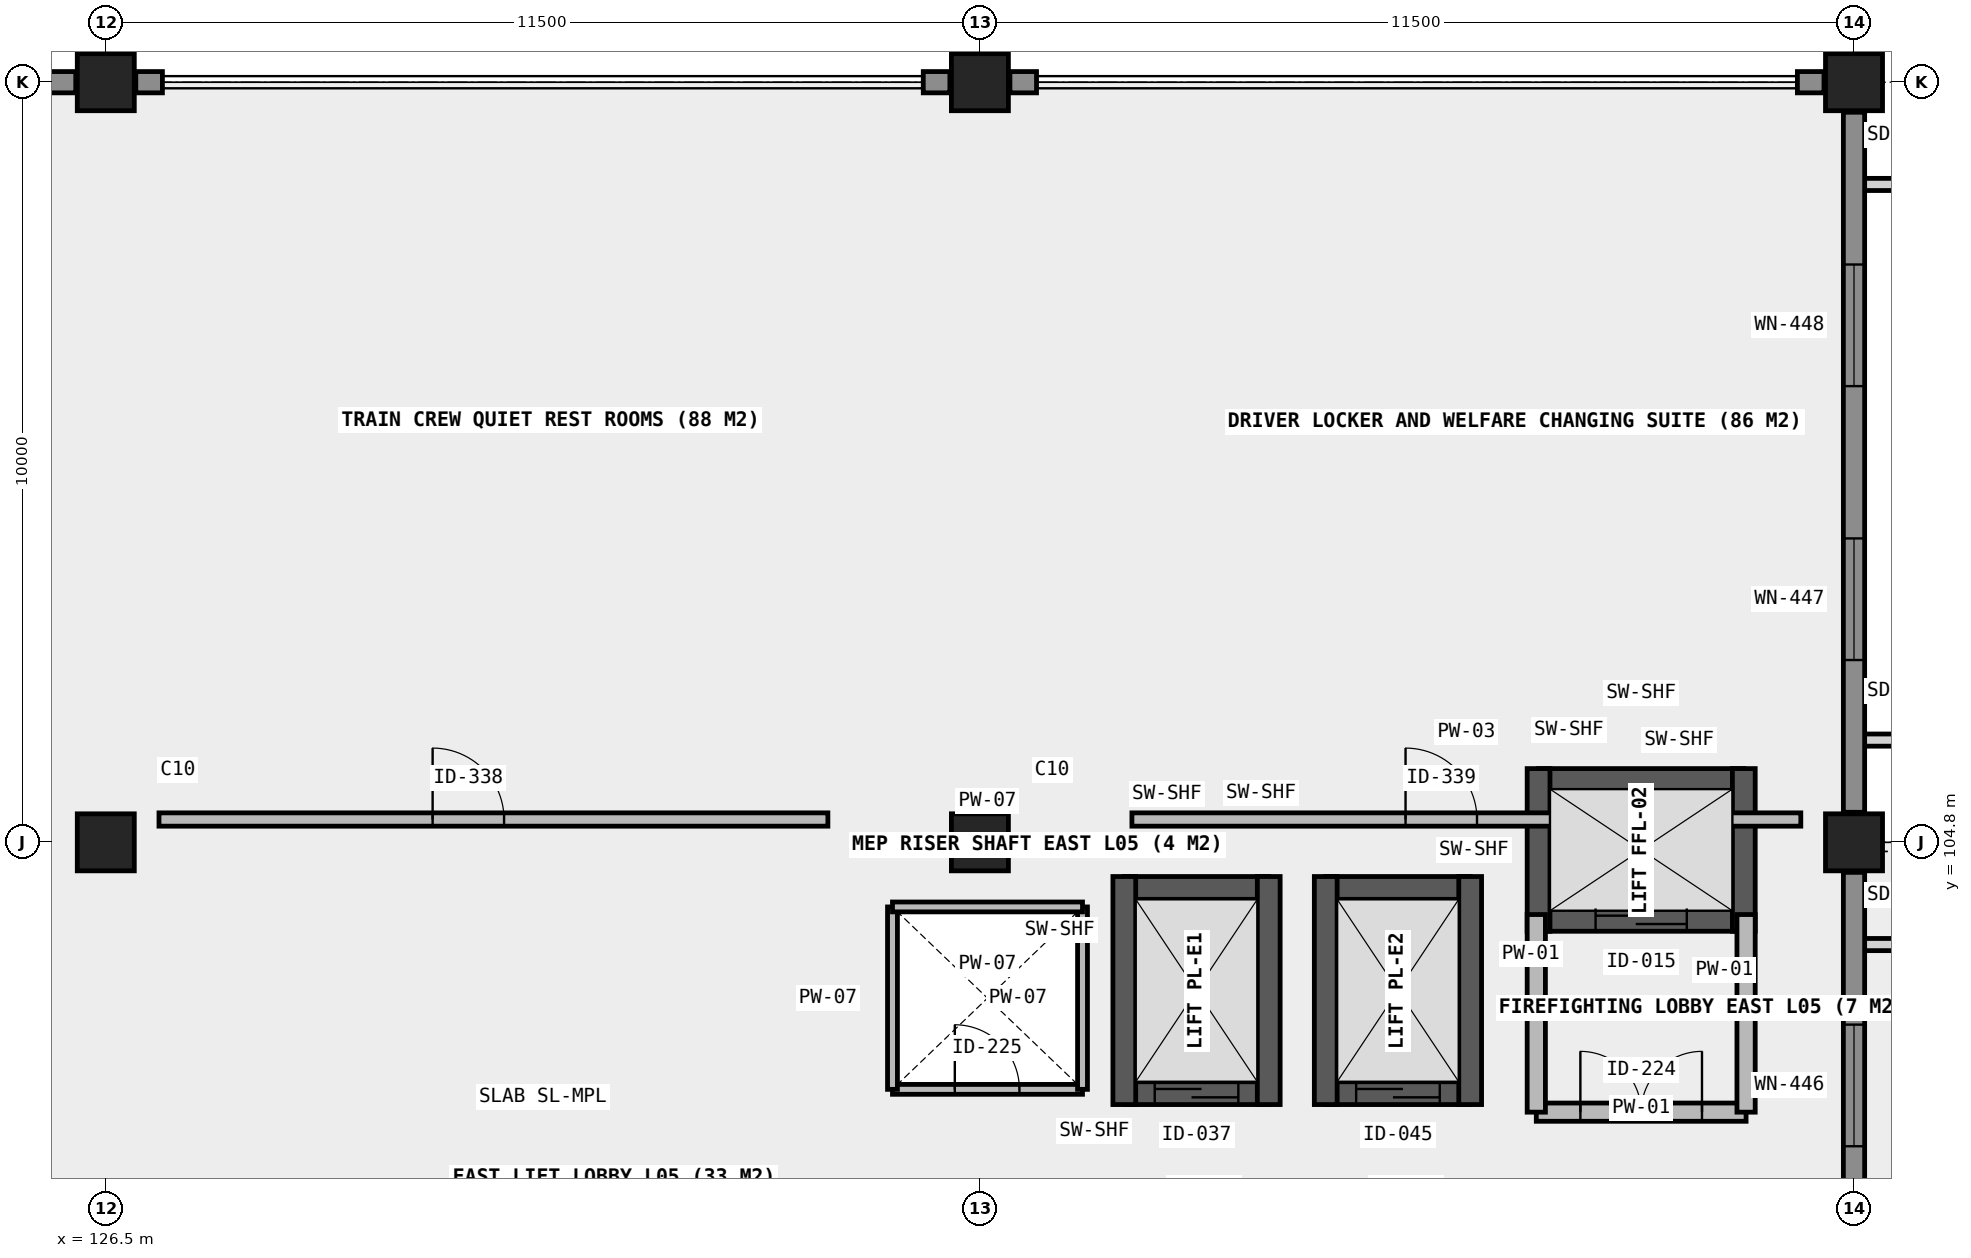
"""IFC4 building model, lengths in metres.
Left out: names, types, materials, properties, quantities, classifications, styles, units other than length and angle.
Written with IfcOpenShell. Run it as: python <this file> out.ifc"""

import sys

from ifc_helpers import new_model, si_unit, direction, frame, frame_2d, origin, origin_2d, place, context, subcontext, project, spatial, rectangle, circle, extrude, element, fill, save


model = new_model("IFC4")
c1 = context("Model", 3, precision=1e-05, world=origin(), true_north=direction((0.0, 1.0)))
c2 = subcontext(c1, "Body", "Model", "MODEL_VIEW")
j1 = project(units=[si_unit("LENGTHUNIT", "METRE"), si_unit("PLANEANGLEUNIT", "RADIAN")], contexts=[c1])
p1 = place(None, origin())
s1 = spatial("IfcSite", under=j1, at=p1, CompositionType="ELEMENT")
p2 = place(p1, origin())
s2 = spatial("IfcBuilding", under=s1, at=p2, CompositionType="ELEMENT")
p3 = place(p2, frame((0.0, 0.0, 22.46)))
s3 = spatial("IfcBuildingStorey", under=s2, at=p3, CompositionType="ELEMENT", Elevation=22.46)
for number, where, z_axis, x_axis in (
    (1, (126.5, 104.8, 0.0), (0.0, 0.0, 1.0), (1.0, 0.0, 0.0)),
    (2, (126.5, 114.8, 0.0), (0.0, 0.0, 1.0), (1.0, 0.0, 0.0)),
    (3, (138.0, 104.8, 0.0), (0.0, 0.0, 1.0), (1.0, 0.0, 0.0)),
    (4, (138.0, 114.8, 0.0), (0.0, 0.0, 1.0), (1.0, 0.0, 0.0)),
    (5, (149.5, 104.8, 0.0), (0.0, 0.0, 1.0), (1.0, 0.0, 0.0)),
    (6, (149.5, 114.8, 0.0), (0.0, 0.0, 1.0), (1.0, 0.0, 0.0)),
):
    element("IfcColumn", number, at=place(p3, frame(where, z_axis=z_axis, x_axis=x_axis)), inside=s3, PredefinedType="COLUMN", context=c2, shape_type="SweptSolid", body=[
        extrude(circle(Radius=0.375, at=origin_2d()), origin(), (0.0, 0.0, 1.0), 4.44),
    ])
p4 = place(p3, frame((145.35, 103.78, 0.0), z_axis=(0.0, 0.0, 1.0), x_axis=(1.0, 0.0, 0.0)))
e7 = element("IfcWall", 7, at=p4, inside=s3, PredefinedType="SHEAR", context=c2, shape_type="SweptSolid", body=[
    extrude(rectangle(XDim=2.7, YDim=0.3, at=frame_2d((1.35, 0.0))), origin(), (0.0, 0.0, 1.0), 4.16),
])
p5 = place(p4, frame((0.75, 0.0, 0.0)))
e8 = element("IfcOpeningElement", 8, at=p5, cuts=e7, PredefinedType="OPENING", context=c2, shape_type="SweptSolid", body=[
    extrude(rectangle(XDim=1.2, YDim=2.15, at=frame_2d((0.6, 1.075))), frame((0.0, 0.16, 0.0), z_axis=(0.0, -1.0, 0.0), x_axis=(1.0, 0.0, 0.0)), (0.0, 0.0, 1.0), 0.32),
])
p6 = place(p3, frame((145.35, 105.62, 0.0), z_axis=(0.0, 0.0, 1.0), x_axis=(1.0, 0.0, 0.0)))
e9 = element("IfcWall", 9, at=p6, inside=s3, PredefinedType="SHEAR", context=c2, shape_type="SweptSolid", body=[
    extrude(rectangle(XDim=2.7, YDim=0.3, at=frame_2d((1.35, 0.0))), origin(), (0.0, 0.0, 1.0), 4.16),
])
for number, where, z_axis, x_axis in (
    (10, (145.35, 103.63, 0.0), (0.0, 0.0, 1.0), (0.0, 1.0, 0.0)),
    (11, (148.05, 103.63, 0.0), (0.0, 0.0, 1.0), (0.0, 1.0, 0.0)),
):
    element("IfcWall", number, at=place(p3, frame(where, z_axis=z_axis, x_axis=x_axis)), inside=s3, PredefinedType="SHEAR", context=c2, shape_type="SweptSolid", body=[
        extrude(rectangle(XDim=2.14, YDim=0.3, at=frame_2d((1.07, 0.0))), origin(), (0.0, 0.0, 1.0), 4.16),
    ])
p7 = place(p3, frame((139.9, 101.5, 0.0), z_axis=(0.0, 0.0, 1.0), x_axis=(1.0, 0.0, 0.0)))
e12 = element("IfcWall", 12, at=p7, inside=s3, PredefinedType="SHEAR", context=c2, shape_type="SweptSolid", body=[
    extrude(rectangle(XDim=1.9, YDim=0.3, at=frame_2d((0.95, 0.0))), origin(), (0.0, 0.0, 1.0), 4.16),
])
p8 = place(p7, frame((0.4, 0.0, 0.0)))
e13 = element("IfcOpeningElement", 13, at=p8, cuts=e12, PredefinedType="OPENING", context=c2, shape_type="SweptSolid", body=[
    extrude(rectangle(XDim=1.1, YDim=2.15, at=frame_2d((0.55, 1.075))), frame((0.0, 0.16, 0.0), z_axis=(0.0, -1.0, 0.0), x_axis=(1.0, 0.0, 0.0)), (0.0, 0.0, 1.0), 0.32),
])
p9 = place(p3, frame((139.9, 104.2, 0.0), z_axis=(0.0, 0.0, 1.0), x_axis=(1.0, 0.0, 0.0)))
e14 = element("IfcWall", 14, at=p9, inside=s3, PredefinedType="SHEAR", context=c2, shape_type="SweptSolid", body=[
    extrude(rectangle(XDim=1.9, YDim=0.3, at=frame_2d((0.95, 0.0))), origin(), (0.0, 0.0, 1.0), 4.16),
])
for number, where, z_axis, x_axis in (
    (15, (139.9, 101.35, 0.0), (0.0, 0.0, 1.0), (0.0, 1.0, 0.0)),
    (16, (141.8, 101.35, 0.0), (0.0, 0.0, 1.0), (0.0, 1.0, 0.0)),
):
    element("IfcWall", number, at=place(p3, frame(where, z_axis=z_axis, x_axis=x_axis)), inside=s3, PredefinedType="SHEAR", context=c2, shape_type="SweptSolid", body=[
        extrude(rectangle(XDim=3.0, YDim=0.3, at=frame_2d((1.5, 0.0))), origin(), (0.0, 0.0, 1.0), 4.16),
    ])
p10 = place(p3, frame((142.55, 101.5, 0.0), z_axis=(0.0, 0.0, 1.0), x_axis=(1.0, 0.0, 0.0)))
e17 = element("IfcWall", 17, at=p10, inside=s3, PredefinedType="SHEAR", context=c2, shape_type="SweptSolid", body=[
    extrude(rectangle(XDim=1.9, YDim=0.3, at=frame_2d((0.95, 0.0))), origin(), (0.0, 0.0, 1.0), 4.16),
])
p11 = place(p10, frame((0.4, 0.0, 0.0)))
e18 = element("IfcOpeningElement", 18, at=p11, cuts=e17, PredefinedType="OPENING", context=c2, shape_type="SweptSolid", body=[
    extrude(rectangle(XDim=1.1, YDim=2.15, at=frame_2d((0.55, 1.075))), frame((0.0, 0.16, 0.0), z_axis=(0.0, -1.0, 0.0), x_axis=(1.0, 0.0, 0.0)), (0.0, 0.0, 1.0), 0.32),
])
p12 = place(p3, frame((142.55, 104.2, 0.0), z_axis=(0.0, 0.0, 1.0), x_axis=(1.0, 0.0, 0.0)))
e19 = element("IfcWall", 19, at=p12, inside=s3, PredefinedType="SHEAR", context=c2, shape_type="SweptSolid", body=[
    extrude(rectangle(XDim=1.9, YDim=0.3, at=frame_2d((0.95, 0.0))), origin(), (0.0, 0.0, 1.0), 4.16),
])
for number, where, z_axis, x_axis in (
    (20, (142.55, 101.35, 0.0), (0.0, 0.0, 1.0), (0.0, 1.0, 0.0)),
    (21, (144.45, 101.35, 0.0), (0.0, 0.0, 1.0), (0.0, 1.0, 0.0)),
):
    element("IfcWall", number, at=place(p3, frame(where, z_axis=z_axis, x_axis=x_axis)), inside=s3, PredefinedType="SHEAR", context=c2, shape_type="SweptSolid", body=[
        extrude(rectangle(XDim=3.0, YDim=0.3, at=frame_2d((1.5, 0.0))), origin(), (0.0, 0.0, 1.0), 4.16),
    ])
p13 = place(p3, frame((149.5, 95.195, 0.0), z_axis=(0.0, 0.0, 1.0), x_axis=(0.0, 1.0, 0.0)))
e22 = element("IfcWall", 22, at=p13, inside=s3, PredefinedType="SOLIDWALL", context=c2, shape_type="SweptSolid", body=[
    extrude(rectangle(XDim=9.21, YDim=0.28, at=frame_2d((4.605, 0.0))), origin(), (0.0, 0.0, 1.0), 3.36),
])
p14 = place(p13, frame((2.003, 0.0, 0.85)))
e23 = element("IfcOpeningElement", 23, at=p14, cuts=e22, PredefinedType="OPENING", context=c2, shape_type="SweptSolid", body=[
    extrude(rectangle(XDim=1.6, YDim=1.6, at=frame_2d((0.8, 0.8))), frame((0.0, 0.15, 0.0), z_axis=(0.0, -1.0, 0.0), x_axis=(1.0, 0.0, 0.0)), (0.0, 0.0, 1.0), 0.3),
])
p15 = place(p13, frame((5.607, 0.0, 0.85)))
e24 = element("IfcOpeningElement", 24, at=p15, cuts=e22, PredefinedType="OPENING", context=c2, shape_type="SweptSolid", body=[
    extrude(rectangle(XDim=1.6, YDim=1.6, at=frame_2d((0.8, 0.8))), frame((0.0, 0.15, 0.0), z_axis=(0.0, -1.0, 0.0), x_axis=(1.0, 0.0, 0.0)), (0.0, 0.0, 1.0), 0.3),
])
p16 = place(p3, frame((149.5, 105.195, 0.0), z_axis=(0.0, 0.0, 1.0), x_axis=(0.0, 1.0, 0.0)))
e25 = element("IfcWall", 25, at=p16, inside=s3, PredefinedType="SOLIDWALL", context=c2, shape_type="SweptSolid", body=[
    extrude(rectangle(XDim=9.21, YDim=0.28, at=frame_2d((4.605, 0.0))), origin(), (0.0, 0.0, 1.0), 3.36),
])
p17 = place(p16, frame((2.003, 0.0, 0.85)))
e26 = element("IfcOpeningElement", 26, at=p17, cuts=e25, PredefinedType="OPENING", context=c2, shape_type="SweptSolid", body=[
    extrude(rectangle(XDim=1.6, YDim=1.6, at=frame_2d((0.8, 0.8))), frame((0.0, 0.15, 0.0), z_axis=(0.0, -1.0, 0.0), x_axis=(1.0, 0.0, 0.0)), (0.0, 0.0, 1.0), 0.3),
])
p18 = place(p16, frame((5.607, 0.0, 0.85)))
e27 = element("IfcOpeningElement", 27, at=p18, cuts=e25, PredefinedType="OPENING", context=c2, shape_type="SweptSolid", body=[
    extrude(rectangle(XDim=1.6, YDim=1.6, at=frame_2d((0.8, 0.8))), frame((0.0, 0.15, 0.0), z_axis=(0.0, -1.0, 0.0), x_axis=(1.0, 0.0, 0.0)), (0.0, 0.0, 1.0), 0.3),
])
p19 = place(p3, frame((115.395, 114.8, 0.0), z_axis=(0.0, 0.0, 1.0), x_axis=(1.0, 0.0, 0.0)))
e28 = element("IfcWall", 28, at=p19, inside=s3, PredefinedType="SOLIDWALL", context=c2, shape_type="SweptSolid", body=[
    extrude(rectangle(XDim=10.71, YDim=0.28, at=frame_2d((5.355, 0.0))), origin(), (0.0, 0.0, 1.0), 3.36),
])
p20 = place(p19, frame((2.737, 0.0, 0.85)))
e29 = element("IfcOpeningElement", 29, at=p20, cuts=e28, PredefinedType="OPENING", context=c2, shape_type="SweptSolid", body=[
    extrude(rectangle(XDim=1.25, YDim=1.65, at=frame_2d((0.625, 0.825))), frame((0.0, 0.15, 0.0), z_axis=(0.0, -1.0, 0.0), x_axis=(1.0, 0.0, 0.0)), (0.0, 0.0, 1.0), 0.3),
])
p21 = place(p19, frame((6.723, 0.0, 0.85)))
e30 = element("IfcOpeningElement", 30, at=p21, cuts=e28, PredefinedType="OPENING", context=c2, shape_type="SweptSolid", body=[
    extrude(rectangle(XDim=1.25, YDim=1.65, at=frame_2d((0.625, 0.825))), frame((0.0, 0.15, 0.0), z_axis=(0.0, -1.0, 0.0), x_axis=(1.0, 0.0, 0.0)), (0.0, 0.0, 1.0), 0.3),
])
for number, where, z_axis, x_axis in (
    (31, (126.895, 114.8, 0.0), (0.0, 0.0, 1.0), (1.0, 0.0, 0.0)),
    (32, (137.255, 114.8, 0.0), (0.0, 0.0, 1.0), (1.0, 0.0, 0.0)),
    (33, (138.395, 114.8, 0.0), (0.0, 0.0, 1.0), (1.0, 0.0, 0.0)),
    (34, (148.755, 114.8, 0.0), (0.0, 0.0, 1.0), (1.0, 0.0, 0.0)),
):
    element("IfcWall", number, at=place(p3, frame(where, z_axis=z_axis, x_axis=x_axis)), inside=s3, PredefinedType="SOLIDWALL", context=c2, shape_type="SweptSolid", body=[
        extrude(rectangle(XDim=0.35, YDim=0.28, at=frame_2d((0.175, 0.0))), origin(), (0.0, 0.0, 1.0), 4.15),
    ])
p22 = place(p3, frame((145.32, 101.25, 0.0), z_axis=(0.0, 0.0, 1.0), x_axis=(1.0, 0.0, 0.0)))
e35 = element("IfcWall", 35, at=p22, inside=s3, PredefinedType="SOLIDWALL", context=c2, shape_type="SweptSolid", body=[
    extrude(rectangle(XDim=2.76, YDim=0.24, at=frame_2d((1.38, 0.0))), origin(), (0.0, 0.0, 1.0), 4.14),
])
p23 = place(p22, frame((0.58, 0.0, 0.0)))
e36 = element("IfcOpeningElement", 36, at=p23, cuts=e35, PredefinedType="OPENING", context=c2, shape_type="SweptSolid", body=[
    extrude(rectangle(XDim=1.6, YDim=2.15, at=frame_2d((0.8, 1.075))), frame((0.0, 0.13, 0.0), z_axis=(0.0, -1.0, 0.0), x_axis=(1.0, 0.0, 0.0)), (0.0, 0.0, 1.0), 0.26),
])
for number, where, z_axis, x_axis in (
    (37, (145.32, 101.25, 0.0), (0.0, 0.0, 1.0), (0.0, 1.0, 0.0)),
    (38, (148.08, 101.25, 0.0), (0.0, 0.0, 1.0), (0.0, 1.0, 0.0)),
):
    element("IfcWall", number, at=place(p3, frame(where, z_axis=z_axis, x_axis=x_axis)), inside=s3, PredefinedType="SOLIDWALL", context=c2, shape_type="SweptSolid", body=[
        extrude(rectangle(XDim=2.6, YDim=0.24, at=frame_2d((1.3, 0.0))), origin(), (0.0, 0.0, 1.0), 4.14),
    ])
p24 = place(p3, frame((136.85, 101.55, 0.0), z_axis=(0.0, 0.0, 1.0), x_axis=(1.0, 0.0, 0.0)))
e39 = element("IfcWall", 39, at=p24, inside=s3, PredefinedType="PLUMBINGWALL", context=c2, shape_type="SweptSolid", body=[
    extrude(rectangle(XDim=2.5, YDim=0.13, at=frame_2d((1.25, 0.0))), origin(), (0.0, 0.0, 1.0), 4.14),
])
p25 = place(p24, frame((0.82, 0.0, 0.0)))
e40 = element("IfcOpeningElement", 40, at=p25, cuts=e39, PredefinedType="OPENING", context=c2, shape_type="SweptSolid", body=[
    extrude(rectangle(XDim=0.85, YDim=2.0, at=frame_2d((0.425, 1.0))), frame((0.0, 0.075, 0.0), z_axis=(0.0, -1.0, 0.0), x_axis=(1.0, 0.0, 0.0)), (0.0, 0.0, 1.0), 0.15),
])
for number, where, z_axis, x_axis in (
    (41, (136.85, 101.55, 0.0), (0.0, 0.0, 1.0), (0.0, 1.0, 0.0)),
    (42, (139.35, 101.55, 0.0), (0.0, 0.0, 1.0), (0.0, 1.0, 0.0)),
):
    element("IfcWall", number, at=place(p3, frame(where, z_axis=z_axis, x_axis=x_axis)), inside=s3, PredefinedType="PLUMBINGWALL", context=c2, shape_type="SweptSolid", body=[
        extrude(rectangle(XDim=2.4, YDim=0.13, at=frame_2d((1.2, 0.0))), origin(), (0.0, 0.0, 1.0), 4.14),
    ])
p26 = place(p3, frame((136.85, 103.95, 0.0), z_axis=(0.0, 0.0, 1.0), x_axis=(1.0, 0.0, 0.0)))
e43 = element("IfcWall", 43, at=p26, inside=s3, PredefinedType="PLUMBINGWALL", context=c2, shape_type="SweptSolid", body=[
    extrude(rectangle(XDim=2.5, YDim=0.13, at=frame_2d((1.25, 0.0))), origin(), (0.0, 0.0, 1.0), 4.14),
])
p27 = place(p3, frame((127.2, 105.1, 0.0), z_axis=(0.0, 0.0, 1.0), x_axis=(1.0, 0.0, 0.0)))
e44 = element("IfcWall", 44, at=p27, inside=s3, PredefinedType="PARTITIONING", context=c2, shape_type="SweptSolid", body=[
    extrude(rectangle(XDim=8.8, YDim=0.175, at=frame_2d((4.4, 0.0))), origin(), (0.0, 0.0, 1.0), 4.14),
])
p28 = place(p27, frame((3.6, 0.0, 0.0)))
e45 = element("IfcOpeningElement", 45, at=p28, cuts=e44, PredefinedType="OPENING", context=c2, shape_type="SweptSolid", body=[
    extrude(rectangle(XDim=0.94, YDim=2.15, at=frame_2d((0.47, 1.075))), frame((0.0, 0.098, 0.0), z_axis=(0.0, -1.0, 0.0), x_axis=(1.0, 0.0, 0.0)), (0.0, 0.0, 1.0), 0.195),
])
p29 = place(p3, frame((140.0, 105.1, 0.0), z_axis=(0.0, 0.0, 1.0), x_axis=(1.0, 0.0, 0.0)))
e46 = element("IfcWall", 46, at=p29, inside=s3, PredefinedType="PARTITIONING", context=c2, shape_type="SweptSolid", body=[
    extrude(rectangle(XDim=8.8, YDim=0.175, at=frame_2d((4.4, 0.0))), origin(), (0.0, 0.0, 1.0), 4.14),
])
p30 = place(p29, frame((3.6, 0.0, 0.0)))
e47 = element("IfcOpeningElement", 47, at=p30, cuts=e46, PredefinedType="OPENING", context=c2, shape_type="SweptSolid", body=[
    extrude(rectangle(XDim=0.94, YDim=2.15, at=frame_2d((0.47, 1.075))), frame((0.0, 0.098, 0.0), z_axis=(0.0, -1.0, 0.0), x_axis=(1.0, 0.0, 0.0)), (0.0, 0.0, 1.0), 0.195),
])
p31 = place(p15, origin())
e48 = element("IfcWindow", 48, at=p31, inside=s3, PartitioningType="SINGLE_PANEL", PredefinedType="WINDOW", context=c2, shape_type="SweptSolid", body=[
    extrude(rectangle(XDim=1.6, YDim=1.6, at=frame_2d((0.8, 0.8))), frame((0.0, 0.03, 0.0), z_axis=(0.0, -1.0, 0.0), x_axis=(1.0, 0.0, 0.0)), (0.0, 0.0, 1.0), 0.06),
])
fill(e24, e48)
p32 = place(p17, origin())
e49 = element("IfcWindow", 49, at=p32, inside=s3, PartitioningType="SINGLE_PANEL", PredefinedType="WINDOW", context=c2, shape_type="SweptSolid", body=[
    extrude(rectangle(XDim=1.6, YDim=1.6, at=frame_2d((0.8, 0.8))), frame((0.0, 0.03, 0.0), z_axis=(0.0, -1.0, 0.0), x_axis=(1.0, 0.0, 0.0)), (0.0, 0.0, 1.0), 0.06),
])
fill(e26, e49)
p33 = place(p18, origin())
e50 = element("IfcWindow", 50, at=p33, inside=s3, PartitioningType="SINGLE_PANEL", PredefinedType="WINDOW", context=c2, shape_type="SweptSolid", body=[
    extrude(rectangle(XDim=1.6, YDim=1.6, at=frame_2d((0.8, 0.8))), frame((0.0, 0.03, 0.0), z_axis=(0.0, -1.0, 0.0), x_axis=(1.0, 0.0, 0.0)), (0.0, 0.0, 1.0), 0.06),
])
fill(e27, e50)
p34 = place(p5, origin())
e51 = element("IfcDoor", 51, at=p34, inside=s3, OperationType="SLIDING_TO_RIGHT", PredefinedType="DOOR", context=c2, shape_type="SweptSolid", body=[
    extrude(rectangle(XDim=1.2, YDim=2.15, at=frame_2d((0.6, 1.075))), frame((0.0, 0.025, 0.0), z_axis=(0.0, -1.0, 0.0), x_axis=(1.0, 0.0, 0.0)), (0.0, 0.0, 1.0), 0.05),
])
fill(e8, e51)
p35 = place(p8, origin())
e52 = element("IfcDoor", 52, at=p35, inside=s3, OperationType="SLIDING_TO_LEFT", PredefinedType="DOOR", context=c2, shape_type="SweptSolid", body=[
    extrude(rectangle(XDim=1.1, YDim=2.15, at=frame_2d((0.55, 1.075))), frame((0.0, 0.025, 0.0), z_axis=(0.0, -1.0, 0.0), x_axis=(1.0, 0.0, 0.0)), (0.0, 0.0, 1.0), 0.05),
])
fill(e13, e52)
p36 = place(p11, origin())
e53 = element("IfcDoor", 53, at=p36, inside=s3, OperationType="SLIDING_TO_LEFT", PredefinedType="DOOR", context=c2, shape_type="SweptSolid", body=[
    extrude(rectangle(XDim=1.1, YDim=2.15, at=frame_2d((0.55, 1.075))), frame((0.0, 0.025, 0.0), z_axis=(0.0, -1.0, 0.0), x_axis=(1.0, 0.0, 0.0)), (0.0, 0.0, 1.0), 0.05),
])
fill(e18, e53)
p37 = place(p23, origin())
e54 = element("IfcDoor", 54, at=p37, inside=s3, OperationType="DOUBLE_DOOR_SINGLE_SWING", PredefinedType="DOOR", context=c2, shape_type="SweptSolid", body=[
    extrude(rectangle(XDim=1.6, YDim=2.15, at=frame_2d((0.8, 1.075))), frame((0.0, 0.025, 0.0), z_axis=(0.0, -1.0, 0.0), x_axis=(1.0, 0.0, 0.0)), (0.0, 0.0, 1.0), 0.05),
])
fill(e36, e54)
p38 = place(p25, origin())
e55 = element("IfcDoor", 55, at=p38, inside=s3, OperationType="SINGLE_SWING_LEFT", PredefinedType="TRAPDOOR", context=c2, shape_type="SweptSolid", body=[
    extrude(rectangle(XDim=0.85, YDim=2.0, at=frame_2d((0.425, 1.0))), frame((0.0, 0.025, 0.0), z_axis=(0.0, -1.0, 0.0), x_axis=(1.0, 0.0, 0.0)), (0.0, 0.0, 1.0), 0.05),
])
fill(e40, e55)
p39 = place(p28, origin())
e56 = element("IfcDoor", 56, at=p39, inside=s3, OperationType="SINGLE_SWING_LEFT", PredefinedType="DOOR", context=c2, shape_type="SweptSolid", body=[
    extrude(rectangle(XDim=0.94, YDim=2.15, at=frame_2d((0.47, 1.075))), frame((0.0, 0.025, 0.0), z_axis=(0.0, -1.0, 0.0), x_axis=(1.0, 0.0, 0.0)), (0.0, 0.0, 1.0), 0.05),
])
fill(e45, e56)
p40 = place(p30, origin())
e57 = element("IfcDoor", 57, at=p40, inside=s3, OperationType="SINGLE_SWING_LEFT", PredefinedType="DOOR", context=c2, shape_type="SweptSolid", body=[
    extrude(rectangle(XDim=0.94, YDim=2.15, at=frame_2d((0.47, 1.075))), frame((0.0, 0.025, 0.0), z_axis=(0.0, -1.0, 0.0), x_axis=(1.0, 0.0, 0.0)), (0.0, 0.0, 1.0), 0.05),
])
fill(e47, e57)
save(model, sys.argv[1])
